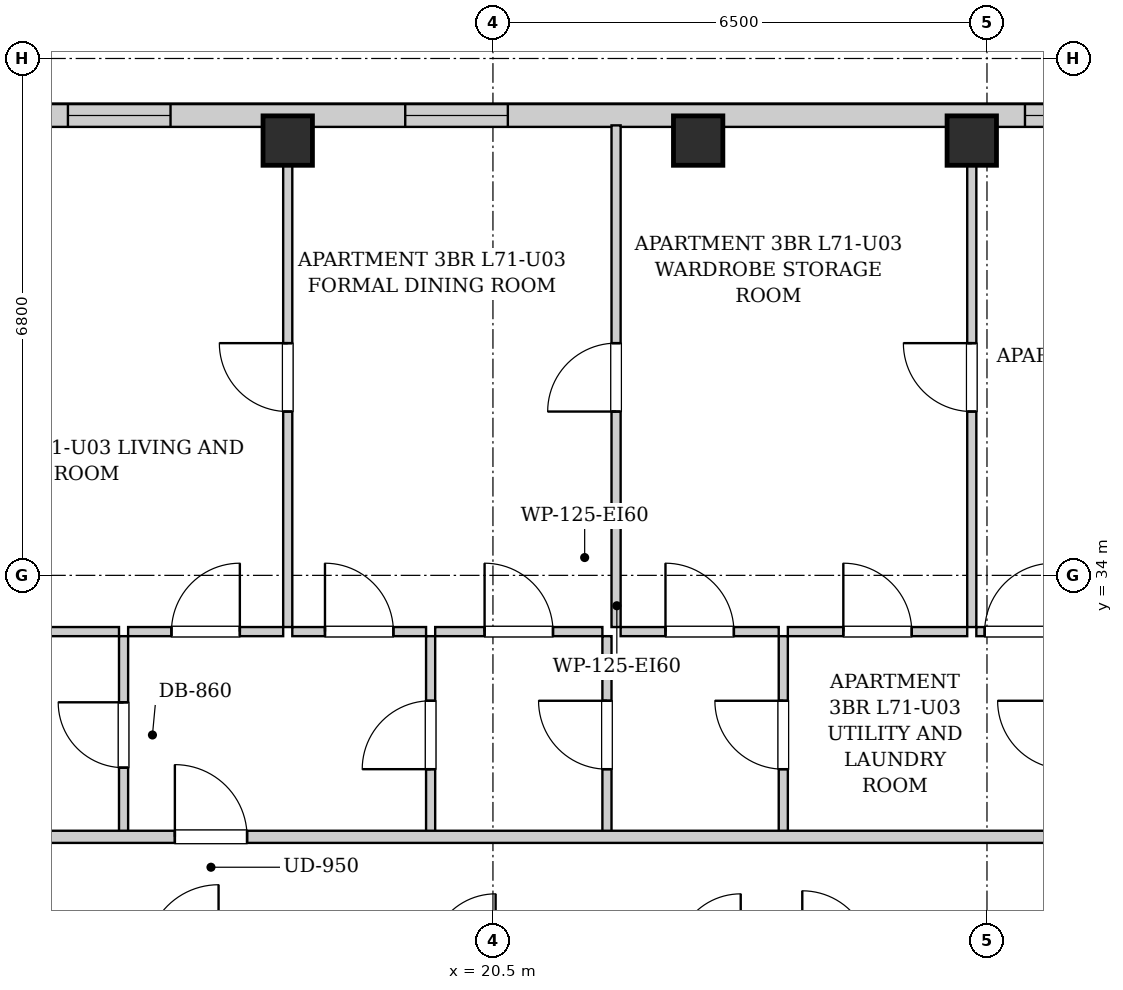
"""IFC4 building model, lengths in metres.
Left out: names, types, materials, properties, quantities, classifications, styles, units other than length and angle.
Written with IfcOpenShell. Run it as: python <this file> out.ifc"""

import sys

from ifc_helpers import new_model, si_unit, direction, frame, frame_2d, origin, origin_2d, place, context, subcontext, project, spatial, rectangle, extrude, element, fill, save


model = new_model("IFC4")
c1 = context("Model", 3, precision=1e-05, world=origin(), true_north=direction((0.0, 1.0)))
c2 = subcontext(c1, "Body", "Model", "MODEL_VIEW")
j1 = project(units=[si_unit("LENGTHUNIT", "METRE"), si_unit("PLANEANGLEUNIT", "RADIAN")], contexts=[c1])
p1 = place(None, origin())
s1 = spatial("IfcSite", under=j1, at=p1, CompositionType="ELEMENT")
p2 = place(p1, origin())
s2 = spatial("IfcBuilding", under=s1, at=p2, CompositionType="ELEMENT")
p3 = place(p2, frame((0.0, 0.0, 244.5)))
s3 = spatial("IfcBuildingStorey", under=s2, at=p3, CompositionType="ELEMENT", Elevation=244.5)
for number, where, z_axis, x_axis in (
    (1, (17.8, 39.72, 0.0), (0.0, 0.0, 1.0), (1.0, 0.0, 0.0)),
    (2, (23.2, 39.72, 0.0), (0.0, 0.0, 1.0), (1.0, 0.0, 0.0)),
    (3, (26.8, 39.72, 0.0), (0.0, 0.0, 1.0), (1.0, 0.0, 0.0)),
):
    element("IfcColumn", number, at=place(p3, frame(where, z_axis=z_axis, x_axis=x_axis)), inside=s3, PredefinedType="COLUMN", context=c2, shape_type="SweptSolid", body=[
        extrude(rectangle(XDim=0.65, YDim=0.65, at=origin_2d()), origin(), (0.0, 0.0, 1.0), 3.4),
    ])
p4 = place(p3, frame((13.1, 40.05, 0.0), z_axis=(0.0, 0.0, 1.0), x_axis=(1.0, 0.0, 0.0)))
e4 = element("IfcWall", 4, at=p4, inside=s3, PredefinedType="SOLIDWALL", context=c2, shape_type="SweptSolid", body=[
    extrude(rectangle(XDim=16.4, YDim=0.3, at=frame_2d((8.2, 0.0))), origin(), (0.0, 0.0, 1.0), 3.14),
])
p5 = place(p4, frame((1.808, 0.0, 0.55)))
e5 = element("IfcOpeningElement", 5, at=p5, cuts=e4, PredefinedType="OPENING", context=c2, shape_type="SweptSolid", body=[
    extrude(rectangle(XDim=1.35, YDim=1.2, at=frame_2d((0.675, 0.6))), frame((0.0, 0.16, 0.0), z_axis=(0.0, -1.0, 0.0), x_axis=(1.0, 0.0, 0.0)), (0.0, 0.0, 1.0), 0.32),
])
p6 = place(p4, frame((6.246, 0.0, 0.55)))
e6 = element("IfcOpeningElement", 6, at=p6, cuts=e4, PredefinedType="OPENING", context=c2, shape_type="SweptSolid", body=[
    extrude(rectangle(XDim=1.35, YDim=1.2, at=frame_2d((0.675, 0.6))), frame((0.0, 0.16, 0.0), z_axis=(0.0, -1.0, 0.0), x_axis=(1.0, 0.0, 0.0)), (0.0, 0.0, 1.0), 0.32),
])
p7 = place(p4, frame((14.4, 0.0, 0.55)))
e7 = element("IfcOpeningElement", 7, at=p7, cuts=e4, PredefinedType="OPENING", context=c2, shape_type="SweptSolid", body=[
    extrude(rectangle(XDim=1.35, YDim=1.2, at=frame_2d((0.675, 0.6))), frame((0.0, 0.16, 0.0), z_axis=(0.0, -1.0, 0.0), x_axis=(1.0, 0.0, 0.0)), (0.0, 0.0, 1.0), 0.32),
])
p8 = place(p3, frame((15.64, 30.6, 0.0), z_axis=(0.0, 0.0, 1.0), x_axis=(0.0, 1.0, 0.0)))
e8 = element("IfcWall", 8, at=p8, inside=s3, PredefinedType="PARTITIONING", context=c2, shape_type="SweptSolid", body=[
    extrude(rectangle(XDim=2.6, YDim=0.12, at=frame_2d((1.3, 0.0))), origin(), (0.0, 0.0, 1.0), 3.14),
])
p9 = place(p8, frame((0.87, 0.0, 0.0)))
e9 = element("IfcOpeningElement", 9, at=p9, cuts=e8, PredefinedType="OPENING", context=c2, shape_type="SweptSolid", body=[
    extrude(rectangle(XDim=0.86, YDim=2.05, at=frame_2d((0.43, 1.025))), frame((0.0, 0.07, 0.0), z_axis=(0.0, -1.0, 0.0), x_axis=(1.0, 0.0, 0.0)), (0.0, 0.0, 1.0), 0.14),
])
p10 = place(p3, frame((13.18, 33.26, 0.0), z_axis=(0.0, 0.0, 1.0), x_axis=(1.0, 0.0, 0.0)))
e10 = element("IfcWall", 10, at=p10, inside=s3, PredefinedType="PARTITIONING", context=c2, shape_type="SweptSolid", body=[
    extrude(rectangle(XDim=2.4, YDim=0.12, at=frame_2d((1.2, 0.0))), origin(), (0.0, 0.0, 1.0), 3.14),
])
p11 = place(p3, frame((19.68, 30.6, 0.0), z_axis=(0.0, 0.0, 1.0), x_axis=(0.0, 1.0, 0.0)))
e11 = element("IfcWall", 11, at=p11, inside=s3, PredefinedType="PARTITIONING", context=c2, shape_type="SweptSolid", body=[
    extrude(rectangle(XDim=2.6, YDim=0.12, at=frame_2d((1.3, 0.0))), origin(), (0.0, 0.0, 1.0), 3.14),
])
p12 = place(p11, frame((0.85, 0.0, 0.0)))
e12 = element("IfcOpeningElement", 12, at=p12, cuts=e11, PredefinedType="OPENING", context=c2, shape_type="SweptSolid", body=[
    extrude(rectangle(XDim=0.9, YDim=2.05, at=frame_2d((0.45, 1.025))), frame((0.0, 0.07, 0.0), z_axis=(0.0, -1.0, 0.0), x_axis=(1.0, 0.0, 0.0)), (0.0, 0.0, 1.0), 0.14),
])
p13 = place(p3, frame((15.7, 33.26, 0.0), z_axis=(0.0, 0.0, 1.0), x_axis=(1.0, 0.0, 0.0)))
e13 = element("IfcWall", 13, at=p13, inside=s3, PredefinedType="PARTITIONING", context=c2, shape_type="SweptSolid", body=[
    extrude(rectangle(XDim=2.04, YDim=0.12, at=frame_2d((1.02, 0.0))), origin(), (0.0, 0.0, 1.0), 3.14),
])
p14 = place(p13, frame((0.57, 0.0, 0.0)))
e14 = element("IfcOpeningElement", 14, at=p14, cuts=e13, PredefinedType="OPENING", context=c2, shape_type="SweptSolid", body=[
    extrude(rectangle(XDim=0.9, YDim=2.05, at=frame_2d((0.45, 1.025))), frame((0.0, 0.07, 0.0), z_axis=(0.0, -1.0, 0.0), x_axis=(1.0, 0.0, 0.0)), (0.0, 0.0, 1.0), 0.14),
])
p15 = place(p3, frame((17.86, 33.26, 0.0), z_axis=(0.0, 0.0, 1.0), x_axis=(1.0, 0.0, 0.0)))
e15 = element("IfcWall", 15, at=p15, inside=s3, PredefinedType="PARTITIONING", context=c2, shape_type="SweptSolid", body=[
    extrude(rectangle(XDim=1.76, YDim=0.12, at=frame_2d((0.88, 0.0))), origin(), (0.0, 0.0, 1.0), 3.14),
])
p16 = place(p15, frame((0.43, 0.0, 0.0)))
e16 = element("IfcOpeningElement", 16, at=p16, cuts=e15, PredefinedType="OPENING", context=c2, shape_type="SweptSolid", body=[
    extrude(rectangle(XDim=0.9, YDim=2.05, at=frame_2d((0.45, 1.025))), frame((0.0, 0.07, 0.0), z_axis=(0.0, -1.0, 0.0), x_axis=(1.0, 0.0, 0.0)), (0.0, 0.0, 1.0), 0.14),
])
p17 = place(p3, frame((22.0, 30.6, 0.0), z_axis=(0.0, 0.0, 1.0), x_axis=(0.0, 1.0, 0.0)))
e17 = element("IfcWall", 17, at=p17, inside=s3, PredefinedType="PARTITIONING", context=c2, shape_type="SweptSolid", body=[
    extrude(rectangle(XDim=2.6, YDim=0.12, at=frame_2d((1.3, 0.0))), origin(), (0.0, 0.0, 1.0), 3.14),
])
p18 = place(p17, frame((0.85, 0.0, 0.0)))
e18 = element("IfcOpeningElement", 18, at=p18, cuts=e17, PredefinedType="OPENING", context=c2, shape_type="SweptSolid", body=[
    extrude(rectangle(XDim=0.9, YDim=2.05, at=frame_2d((0.45, 1.025))), frame((0.0, 0.07, 0.0), z_axis=(0.0, -1.0, 0.0), x_axis=(1.0, 0.0, 0.0)), (0.0, 0.0, 1.0), 0.14),
])
p19 = place(p3, frame((19.74, 33.26, 0.0), z_axis=(0.0, 0.0, 1.0), x_axis=(1.0, 0.0, 0.0)))
e19 = element("IfcWall", 19, at=p19, inside=s3, PredefinedType="PARTITIONING", context=c2, shape_type="SweptSolid", body=[
    extrude(rectangle(XDim=2.2, YDim=0.12, at=frame_2d((1.1, 0.0))), origin(), (0.0, 0.0, 1.0), 3.14),
])
p20 = place(p19, frame((0.65, 0.0, 0.0)))
e20 = element("IfcOpeningElement", 20, at=p20, cuts=e19, PredefinedType="OPENING", context=c2, shape_type="SweptSolid", body=[
    extrude(rectangle(XDim=0.9, YDim=2.05, at=frame_2d((0.45, 1.025))), frame((0.0, 0.07, 0.0), z_axis=(0.0, -1.0, 0.0), x_axis=(1.0, 0.0, 0.0)), (0.0, 0.0, 1.0), 0.14),
])
p21 = place(p3, frame((24.32, 30.6, 0.0), z_axis=(0.0, 0.0, 1.0), x_axis=(0.0, 1.0, 0.0)))
e21 = element("IfcWall", 21, at=p21, inside=s3, PredefinedType="PARTITIONING", context=c2, shape_type="SweptSolid", body=[
    extrude(rectangle(XDim=2.6, YDim=0.12, at=frame_2d((1.3, 0.0))), origin(), (0.0, 0.0, 1.0), 3.14),
])
p22 = place(p21, frame((0.85, 0.0, 0.0)))
e22 = element("IfcOpeningElement", 22, at=p22, cuts=e21, PredefinedType="OPENING", context=c2, shape_type="SweptSolid", body=[
    extrude(rectangle(XDim=0.9, YDim=2.05, at=frame_2d((0.45, 1.025))), frame((0.0, 0.07, 0.0), z_axis=(0.0, -1.0, 0.0), x_axis=(1.0, 0.0, 0.0)), (0.0, 0.0, 1.0), 0.14),
])
p23 = place(p3, frame((22.18, 33.26, 0.0), z_axis=(0.0, 0.0, 1.0), x_axis=(1.0, 0.0, 0.0)))
e23 = element("IfcWall", 23, at=p23, inside=s3, PredefinedType="PARTITIONING", context=c2, shape_type="SweptSolid", body=[
    extrude(rectangle(XDim=2.08, YDim=0.12, at=frame_2d((1.04, 0.0))), origin(), (0.0, 0.0, 1.0), 3.14),
])
p24 = place(p23, frame((0.59, 0.0, 0.0)))
e24 = element("IfcOpeningElement", 24, at=p24, cuts=e23, PredefinedType="OPENING", context=c2, shape_type="SweptSolid", body=[
    extrude(rectangle(XDim=0.9, YDim=2.05, at=frame_2d((0.45, 1.025))), frame((0.0, 0.07, 0.0), z_axis=(0.0, -1.0, 0.0), x_axis=(1.0, 0.0, 0.0)), (0.0, 0.0, 1.0), 0.14),
])
p25 = place(p3, frame((24.38, 33.26, 0.0), z_axis=(0.0, 0.0, 1.0), x_axis=(1.0, 0.0, 0.0)))
e25 = element("IfcWall", 25, at=p25, inside=s3, PredefinedType="PARTITIONING", context=c2, shape_type="SweptSolid", body=[
    extrude(rectangle(XDim=2.36, YDim=0.12, at=frame_2d((1.18, 0.0))), origin(), (0.0, 0.0, 1.0), 3.14),
])
p26 = place(p25, frame((0.73, 0.0, 0.0)))
e26 = element("IfcOpeningElement", 26, at=p26, cuts=e25, PredefinedType="OPENING", context=c2, shape_type="SweptSolid", body=[
    extrude(rectangle(XDim=0.9, YDim=2.05, at=frame_2d((0.45, 1.025))), frame((0.0, 0.07, 0.0), z_axis=(0.0, -1.0, 0.0), x_axis=(1.0, 0.0, 0.0)), (0.0, 0.0, 1.0), 0.14),
])
p27 = place(p3, frame((26.86, 33.26, 0.0), z_axis=(0.0, 0.0, 1.0), x_axis=(1.0, 0.0, 0.0)))
e27 = element("IfcWall", 27, at=p27, inside=s3, PredefinedType="PARTITIONING", context=c2, shape_type="SweptSolid", body=[
    extrude(rectangle(XDim=1.12, YDim=0.12, at=frame_2d((0.56, 0.0))), origin(), (0.0, 0.0, 1.0), 3.14),
])
p28 = place(p27, frame((0.11, 0.0, 0.0)))
e28 = element("IfcOpeningElement", 28, at=p28, cuts=e27, PredefinedType="OPENING", context=c2, shape_type="SweptSolid", body=[
    extrude(rectangle(XDim=0.9, YDim=2.05, at=frame_2d((0.45, 1.025))), frame((0.0, 0.07, 0.0), z_axis=(0.0, -1.0, 0.0), x_axis=(1.0, 0.0, 0.0)), (0.0, 0.0, 1.0), 0.14),
])
p29 = place(p3, frame((17.8, 33.32, 0.0), z_axis=(0.0, 0.0, 1.0), x_axis=(0.0, 1.0, 0.0)))
e29 = element("IfcWall", 29, at=p29, inside=s3, PredefinedType="PARTITIONING", context=c2, shape_type="SweptSolid", body=[
    extrude(rectangle(XDim=6.6, YDim=0.12, at=frame_2d((3.3, 0.0))), origin(), (0.0, 0.0, 1.0), 2.668),
])
p30 = place(p29, frame((2.835, 0.0, 0.0)))
e30 = element("IfcOpeningElement", 30, at=p30, cuts=e29, PredefinedType="OPENING", context=c2, shape_type="SweptSolid", body=[
    extrude(rectangle(XDim=0.9, YDim=2.05, at=frame_2d((0.45, 1.025))), frame((0.0, 0.07, 0.0), z_axis=(0.0, -1.0, 0.0), x_axis=(1.0, 0.0, 0.0)), (0.0, 0.0, 1.0), 0.14),
])
p31 = place(p3, frame((22.12, 33.32, 0.0), z_axis=(0.0, 0.0, 1.0), x_axis=(0.0, 1.0, 0.0)))
e31 = element("IfcWall", 31, at=p31, inside=s3, PredefinedType="PARTITIONING", context=c2, shape_type="SweptSolid", body=[
    extrude(rectangle(XDim=6.6, YDim=0.12, at=frame_2d((3.3, 0.0))), origin(), (0.0, 0.0, 1.0), 3.14),
])
p32 = place(p31, frame((2.835, 0.0, 0.0)))
e32 = element("IfcOpeningElement", 32, at=p32, cuts=e31, PredefinedType="OPENING", context=c2, shape_type="SweptSolid", body=[
    extrude(rectangle(XDim=0.9, YDim=2.05, at=frame_2d((0.45, 1.025))), frame((0.0, 0.07, 0.0), z_axis=(0.0, -1.0, 0.0), x_axis=(1.0, 0.0, 0.0)), (0.0, 0.0, 1.0), 0.14),
])
p33 = place(p3, frame((26.8, 33.32, 0.0), z_axis=(0.0, 0.0, 1.0), x_axis=(0.0, 1.0, 0.0)))
e33 = element("IfcWall", 33, at=p33, inside=s3, PredefinedType="PARTITIONING", context=c2, shape_type="SweptSolid", body=[
    extrude(rectangle(XDim=6.6, YDim=0.12, at=frame_2d((3.3, 0.0))), origin(), (0.0, 0.0, 1.0), 3.14),
])
p34 = place(p33, frame((2.835, 0.0, 0.0)))
e34 = element("IfcOpeningElement", 34, at=p34, cuts=e33, PredefinedType="OPENING", context=c2, shape_type="SweptSolid", body=[
    extrude(rectangle(XDim=0.9, YDim=2.05, at=frame_2d((0.45, 1.025))), frame((0.0, 0.07, 0.0), z_axis=(0.0, -1.0, 0.0), x_axis=(1.0, 0.0, 0.0)), (0.0, 0.0, 1.0), 0.14),
])
p35 = place(p3, frame((13.15, 30.56, 0.0), z_axis=(0.0, 0.0, 1.0), x_axis=(1.0, 0.0, 0.0)))
e35 = element("IfcWall", 35, at=p35, inside=s3, PredefinedType="PARTITIONING", context=c2, shape_type="SweptSolid", body=[
    extrude(rectangle(XDim=24.6, YDim=0.16, at=frame_2d((12.3, 0.0))), origin(), (0.0, 0.0, 1.0), 3.14),
])
p36 = place(p35, frame((3.165, 0.0, 0.0)))
e36 = element("IfcOpeningElement", 36, at=p36, cuts=e35, PredefinedType="OPENING", context=c2, shape_type="SweptSolid", body=[
    extrude(rectangle(XDim=0.95, YDim=2.1, at=frame_2d((0.475, 1.05))), frame((0.0, 0.09, 0.0), z_axis=(0.0, -1.0, 0.0), x_axis=(1.0, 0.0, 0.0)), (0.0, 0.0, 1.0), 0.18),
])
p37 = place(p9, origin())
e37 = element("IfcDoor", 37, at=p37, inside=s3, OperationType="SINGLE_SWING_RIGHT", PredefinedType="DOOR", context=c2, shape_type="SweptSolid", body=[
    extrude(rectangle(XDim=0.86, YDim=2.05, at=frame_2d((0.43, 1.025))), frame((0.0, 0.025, 0.0), z_axis=(0.0, -1.0, 0.0), x_axis=(1.0, 0.0, 0.0)), (0.0, 0.0, 1.0), 0.05),
])
fill(e9, e37)
p38 = place(p12, origin())
e38 = element("IfcDoor", 38, at=p38, inside=s3, OperationType="SINGLE_SWING_LEFT", PredefinedType="DOOR", context=c2, shape_type="SweptSolid", body=[
    extrude(rectangle(XDim=0.9, YDim=2.05, at=frame_2d((0.45, 1.025))), frame((0.0, 0.025, 0.0), z_axis=(0.0, -1.0, 0.0), x_axis=(1.0, 0.0, 0.0)), (0.0, 0.0, 1.0), 0.05),
])
fill(e12, e38)
p39 = place(p14, origin())
e39 = element("IfcDoor", 39, at=p39, inside=s3, OperationType="SINGLE_SWING_RIGHT", PredefinedType="DOOR", context=c2, shape_type="SweptSolid", body=[
    extrude(rectangle(XDim=0.9, YDim=2.05, at=frame_2d((0.45, 1.025))), frame((0.0, 0.025, 0.0), z_axis=(0.0, -1.0, 0.0), x_axis=(1.0, 0.0, 0.0)), (0.0, 0.0, 1.0), 0.05),
])
fill(e14, e39)
p40 = place(p16, origin())
e40 = element("IfcDoor", 40, at=p40, inside=s3, OperationType="SINGLE_SWING_LEFT", PredefinedType="DOOR", context=c2, shape_type="SweptSolid", body=[
    extrude(rectangle(XDim=0.9, YDim=2.05, at=frame_2d((0.45, 1.025))), frame((0.0, 0.025, 0.0), z_axis=(0.0, -1.0, 0.0), x_axis=(1.0, 0.0, 0.0)), (0.0, 0.0, 1.0), 0.05),
])
fill(e16, e40)
p41 = place(p18, origin())
e41 = element("IfcDoor", 41, at=p41, inside=s3, OperationType="SINGLE_SWING_RIGHT", PredefinedType="DOOR", context=c2, shape_type="SweptSolid", body=[
    extrude(rectangle(XDim=0.9, YDim=2.05, at=frame_2d((0.45, 1.025))), frame((0.0, 0.025, 0.0), z_axis=(0.0, -1.0, 0.0), x_axis=(1.0, 0.0, 0.0)), (0.0, 0.0, 1.0), 0.05),
])
fill(e18, e41)
p42 = place(p20, origin())
e42 = element("IfcDoor", 42, at=p42, inside=s3, OperationType="SINGLE_SWING_LEFT", PredefinedType="DOOR", context=c2, shape_type="SweptSolid", body=[
    extrude(rectangle(XDim=0.9, YDim=2.05, at=frame_2d((0.45, 1.025))), frame((0.0, 0.025, 0.0), z_axis=(0.0, -1.0, 0.0), x_axis=(1.0, 0.0, 0.0)), (0.0, 0.0, 1.0), 0.05),
])
fill(e20, e42)
p43 = place(p22, origin())
e43 = element("IfcDoor", 43, at=p43, inside=s3, OperationType="SINGLE_SWING_RIGHT", PredefinedType="DOOR", context=c2, shape_type="SweptSolid", body=[
    extrude(rectangle(XDim=0.9, YDim=2.05, at=frame_2d((0.45, 1.025))), frame((0.0, 0.025, 0.0), z_axis=(0.0, -1.0, 0.0), x_axis=(1.0, 0.0, 0.0)), (0.0, 0.0, 1.0), 0.05),
])
fill(e22, e43)
p44 = place(p24, origin())
e44 = element("IfcDoor", 44, at=p44, inside=s3, OperationType="SINGLE_SWING_LEFT", PredefinedType="DOOR", context=c2, shape_type="SweptSolid", body=[
    extrude(rectangle(XDim=0.9, YDim=2.05, at=frame_2d((0.45, 1.025))), frame((0.0, 0.025, 0.0), z_axis=(0.0, -1.0, 0.0), x_axis=(1.0, 0.0, 0.0)), (0.0, 0.0, 1.0), 0.05),
])
fill(e24, e44)
p45 = place(p26, origin())
e45 = element("IfcDoor", 45, at=p45, inside=s3, OperationType="SINGLE_SWING_LEFT", PredefinedType="DOOR", context=c2, shape_type="SweptSolid", body=[
    extrude(rectangle(XDim=0.9, YDim=2.05, at=frame_2d((0.45, 1.025))), frame((0.0, 0.025, 0.0), z_axis=(0.0, -1.0, 0.0), x_axis=(1.0, 0.0, 0.0)), (0.0, 0.0, 1.0), 0.05),
])
fill(e26, e45)
p46 = place(p28, origin())
e46 = element("IfcDoor", 46, at=p46, inside=s3, OperationType="SINGLE_SWING_RIGHT", PredefinedType="DOOR", context=c2, shape_type="SweptSolid", body=[
    extrude(rectangle(XDim=0.9, YDim=2.05, at=frame_2d((0.45, 1.025))), frame((0.0, 0.025, 0.0), z_axis=(0.0, -1.0, 0.0), x_axis=(1.0, 0.0, 0.0)), (0.0, 0.0, 1.0), 0.05),
])
fill(e28, e46)
p47 = place(p30, origin())
e47 = element("IfcDoor", 47, at=p47, inside=s3, OperationType="SINGLE_SWING_RIGHT", PredefinedType="DOOR", context=c2, shape_type="SweptSolid", body=[
    extrude(rectangle(XDim=0.9, YDim=2.05, at=frame_2d((0.45, 1.025))), frame((0.0, 0.025, 0.0), z_axis=(0.0, -1.0, 0.0), x_axis=(1.0, 0.0, 0.0)), (0.0, 0.0, 1.0), 0.05),
])
fill(e30, e47)
p48 = place(p32, origin())
e48 = element("IfcDoor", 48, at=p48, inside=s3, OperationType="SINGLE_SWING_LEFT", PredefinedType="DOOR", context=c2, shape_type="SweptSolid", body=[
    extrude(rectangle(XDim=0.9, YDim=2.05, at=frame_2d((0.45, 1.025))), frame((0.0, 0.025, 0.0), z_axis=(0.0, -1.0, 0.0), x_axis=(1.0, 0.0, 0.0)), (0.0, 0.0, 1.0), 0.05),
])
fill(e32, e48)
p49 = place(p34, origin())
e49 = element("IfcDoor", 49, at=p49, inside=s3, OperationType="SINGLE_SWING_RIGHT", PredefinedType="DOOR", context=c2, shape_type="SweptSolid", body=[
    extrude(rectangle(XDim=0.9, YDim=2.05, at=frame_2d((0.45, 1.025))), frame((0.0, 0.025, 0.0), z_axis=(0.0, -1.0, 0.0), x_axis=(1.0, 0.0, 0.0)), (0.0, 0.0, 1.0), 0.05),
])
fill(e34, e49)
p50 = place(p36, origin())
e50 = element("IfcDoor", 50, at=p50, inside=s3, OperationType="SINGLE_SWING_LEFT", PredefinedType="DOOR", context=c2, shape_type="SweptSolid", body=[
    extrude(rectangle(XDim=0.95, YDim=2.1, at=frame_2d((0.475, 1.05))), frame((0.0, 0.025, 0.0), z_axis=(0.0, -1.0, 0.0), x_axis=(1.0, 0.0, 0.0)), (0.0, 0.0, 1.0), 0.05),
])
fill(e36, e50)
p51 = place(p5, origin())
e51 = element("IfcWindow", 51, at=p51, inside=s3, PartitioningType="SINGLE_PANEL", PredefinedType="WINDOW", context=c2, shape_type="SweptSolid", body=[
    extrude(rectangle(XDim=1.35, YDim=1.2, at=frame_2d((0.675, 0.6))), frame((0.0, 0.03, 0.0), z_axis=(0.0, -1.0, 0.0), x_axis=(1.0, 0.0, 0.0)), (0.0, 0.0, 1.0), 0.06),
])
fill(e5, e51)
p52 = place(p6, origin())
e52 = element("IfcWindow", 52, at=p52, inside=s3, PartitioningType="SINGLE_PANEL", PredefinedType="WINDOW", context=c2, shape_type="SweptSolid", body=[
    extrude(rectangle(XDim=1.35, YDim=1.2, at=frame_2d((0.675, 0.6))), frame((0.0, 0.03, 0.0), z_axis=(0.0, -1.0, 0.0), x_axis=(1.0, 0.0, 0.0)), (0.0, 0.0, 1.0), 0.06),
])
fill(e6, e52)
p53 = place(p7, origin())
e53 = element("IfcWindow", 53, at=p53, inside=s3, PartitioningType="SINGLE_PANEL", PredefinedType="WINDOW", context=c2, shape_type="SweptSolid", body=[
    extrude(rectangle(XDim=1.35, YDim=1.2, at=frame_2d((0.675, 0.6))), frame((0.0, 0.03, 0.0), z_axis=(0.0, -1.0, 0.0), x_axis=(1.0, 0.0, 0.0)), (0.0, 0.0, 1.0), 0.06),
])
fill(e7, e53)
save(model, sys.argv[1])
